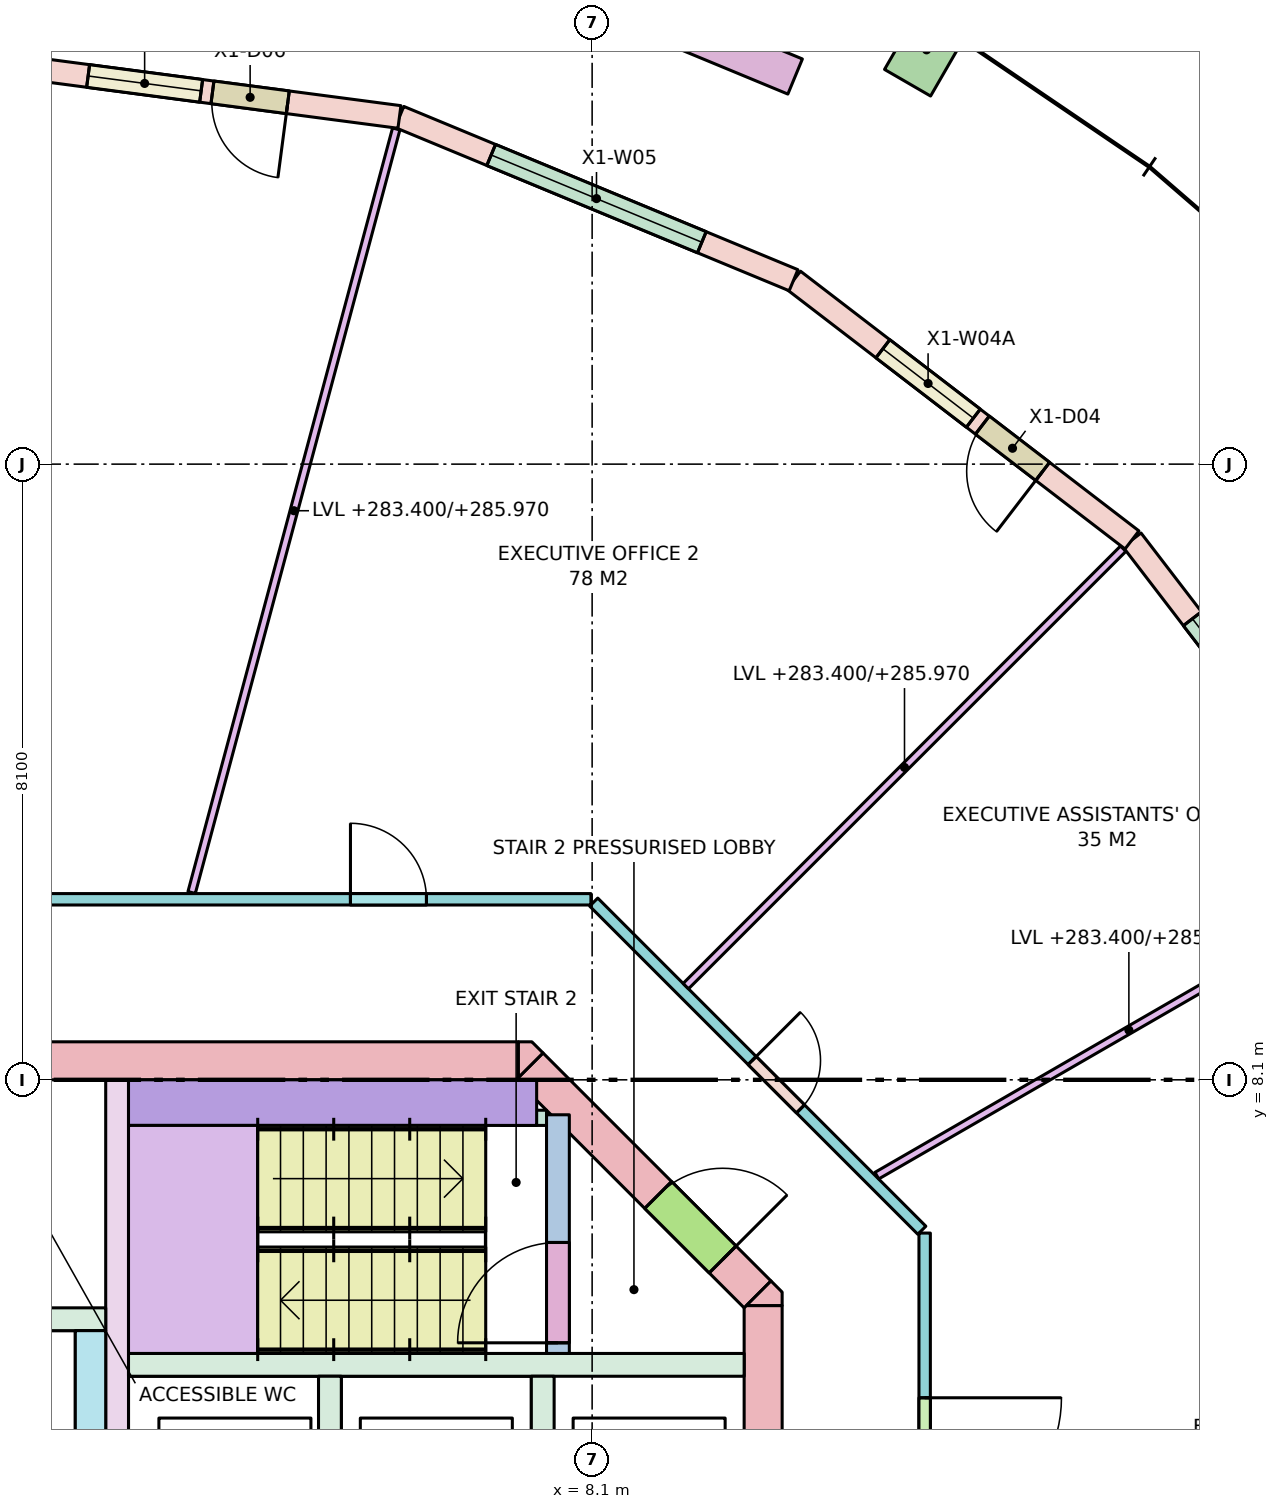
"""IFC4 building model, lengths in metres.
Left out: names, types, materials, properties, quantities, classifications, styles, units other than length and angle.
Written with IfcOpenShell. Run it as: python <this file> out.ifc"""

import sys

from ifc_helpers import new_model, si_unit, direction, frame, frame_2d, origin, origin_2d, place, context, subcontext, project, spatial, polyline, rectangle, outline, extrude, element, fill, save


model = new_model("IFC4")
c1 = context("Model", 3, precision=1e-05, world=origin(), true_north=direction((0.0, 1.0)))
c2 = subcontext(c1, "Body", "Model", "MODEL_VIEW")
j1 = project(units=[si_unit("LENGTHUNIT", "METRE"), si_unit("PLANEANGLEUNIT", "RADIAN")], contexts=[c1])
p1 = place(None, origin())
s1 = spatial("IfcSite", under=j1, at=p1, CompositionType="ELEMENT")
p2 = place(p1, origin())
s2 = spatial("IfcBuilding", under=s1, at=p2, CompositionType="ELEMENT")
p3 = place(p2, frame((0.0, 0.0, 283.4)))
s3 = spatial("IfcBuildingStorey", under=s2, at=p3, CompositionType="ELEMENT", Elevation=283.4)
p4 = place(p3, frame((12.5, 21.651, 0.0), z_axis=(0.0, 0.0, 1.0), x_axis=(-0.866025403784, 0.5, 0.0)))
e1 = element("IfcColumn", 1, at=p4, inside=s3, PredefinedType="COLUMN", context=c2, shape_type="SweptSolid", body=[
    extrude(rectangle(XDim=0.7, YDim=1.0, at=origin_2d()), origin(), (0.0, 0.0, 1.0), 3.7),
])
p5 = place(p3, frame((-7.13, 8.35, -0.28), z_axis=(0.0, 0.0, 1.0), x_axis=(1.0, 0.0, 0.0)))
e2 = element("IfcWall", 2, at=p5, inside=s3, PredefinedType="SHEAR", context=c2, shape_type="SweptSolid", body=[
    extrude(rectangle(XDim=14.26, YDim=0.5, at=frame_2d((7.13, 0.0))), origin(), (0.0, 0.0, 1.0), 3.7),
])
p6 = place(p5, frame((5.48, 0.0, 0.28)))
e3 = element("IfcOpeningElement", 3, at=p6, cuts=e2, PredefinedType="OPENING", context=c2, shape_type="SweptSolid", body=[
    extrude(rectangle(XDim=0.7, YDim=2.1, at=frame_2d((0.35, 1.05))), frame((0.0, 0.26, 0.0), z_axis=(0.0, -1.0, 0.0), x_axis=(1.0, 0.0, 0.0)), (0.0, 0.0, 1.0), 0.52),
])
p7 = place(p5, frame((7.155, 0.0, 0.28)))
e4 = element("IfcOpeningElement", 4, at=p7, cuts=e2, PredefinedType="OPENING", context=c2, shape_type="SweptSolid", body=[
    extrude(rectangle(XDim=0.9, YDim=2.1, at=frame_2d((0.45, 1.05))), frame((0.0, 0.26, 0.0), z_axis=(0.0, -1.0, 0.0), x_axis=(1.0, 0.0, 0.0)), (0.0, 0.0, 1.0), 0.52),
])
p8 = place(p3, frame((10.35, -5.13, -0.28), z_axis=(0.0, 0.0, 1.0), x_axis=(0.0, 1.0, 0.0)))
e5 = element("IfcWall", 5, at=p8, inside=s3, PredefinedType="SHEAR", context=c2, shape_type="SweptSolid", body=[
    extrude(rectangle(XDim=10.26, YDim=0.5, at=frame_2d((5.13, 0.0))), origin(), (0.0, 0.0, 1.0), 3.7),
])
p9 = place(p8, frame((4.13, 0.0, 0.28)))
e6 = element("IfcOpeningElement", 6, at=p9, cuts=e5, PredefinedType="OPENING", context=c2, shape_type="SweptSolid", body=[
    extrude(rectangle(XDim=2.0, YDim=2.1, at=frame_2d((1.0, 1.05))), frame((0.0, 0.26, 0.0), z_axis=(0.0, -1.0, 0.0), x_axis=(1.0, 0.0, 0.0)), (0.0, 0.0, 1.0), 0.52),
])
p10 = place(p3, frame((7.277, 8.277, -0.28), z_axis=(0.0, 0.0, 1.0), x_axis=(0.707106781187, -0.707106781187, 0.0)))
e7 = element("IfcWall", 7, at=p10, inside=s3, PredefinedType="SHEAR", context=c2, shape_type="SweptSolid", body=[
    extrude(rectangle(XDim=4.243, YDim=0.5, at=frame_2d((2.121, 0.0))), origin(), (0.0, 0.0, 1.0), 3.7),
])
p11 = place(p10, frame((2.393, 0.0, 0.28)))
e8 = element("IfcOpeningElement", 8, at=p11, cuts=e7, PredefinedType="OPENING", context=c2, shape_type="SweptSolid", body=[
    extrude(rectangle(XDim=1.2, YDim=2.1, at=frame_2d((0.6, 1.05))), frame((0.0, 0.26, 0.0), z_axis=(0.0, -1.0, 0.0), x_axis=(1.0, 0.0, 0.0)), (0.0, 0.0, 1.0), 0.52),
])
p12 = place(p3, frame((0.0, 0.0, -0.28)))
e9 = element("IfcWall", 9, at=p12, inside=s3, PredefinedType="SHEAR", context=c2, shape_type="SweptSolid", body=[
    extrude(outline(polyline([(10.6, 5.307), (10.6, 5.13), (10.13, 5.13), (10.454, 5.454), (10.6, 5.307)])), origin(), (0.0, 0.0, 1.0), 3.7),
])
p13 = place(p3, frame((0.0, 0.0, -0.28)))
e10 = element("IfcWall", 10, at=p13, inside=s3, PredefinedType="SHEAR", context=c2, shape_type="SweptSolid", body=[
    extrude(outline(polyline([(7.307, 8.6), (7.454, 8.454), (7.13, 8.13), (7.13, 8.6), (7.307, 8.6)])), origin(), (0.0, 0.0, 1.0), 3.7),
])
p14 = place(p3, frame((2.0, 4.35, 0.0), z_axis=(0.0, 0.0, 1.0), x_axis=(1.0, 0.0, 0.0)))
e11 = element("IfcWall", 11, at=p14, inside=s3, PredefinedType="SOLIDWALL", context=c2, shape_type="SweptSolid", body=[
    extrude(rectangle(XDim=8.1, YDim=0.3, at=frame_2d((4.05, 0.0))), origin(), (0.0, 0.0, 1.0), 3.42),
])
for number, where, z_axis, x_axis in (
    (12, (4.65, 1.8, 0.0), (0.0, 0.0, 1.0), (0.0, 1.0, 0.0)),
    (13, (7.45, 1.8, 0.0), (0.0, 0.0, 1.0), (0.0, 1.0, 0.0)),
):
    element("IfcWall", number, at=place(p3, frame(where, z_axis=z_axis, x_axis=x_axis)), inside=s3, PredefinedType="SOLIDWALL", context=c2, shape_type="SweptSolid", body=[
        extrude(rectangle(XDim=2.4, YDim=0.3, at=frame_2d((1.2, 0.0))), origin(), (0.0, 0.0, 1.0), 3.42),
    ])
p15 = place(p3, frame((1.85, 1.5, 0.0), z_axis=(0.0, 0.0, 1.0), x_axis=(0.0, 1.0, 0.0)))
e14 = element("IfcWall", 14, at=p15, inside=s3, PredefinedType="SHEAR", context=c2, shape_type="SweptSolid", body=[
    extrude(rectangle(XDim=6.6, YDim=0.3, at=frame_2d((3.3, 0.0))), origin(), (0.0, 0.0, 1.0), 3.42),
])
p16 = place(p3, frame((1.5, 1.8, 0.0), z_axis=(0.0, 0.0, 1.0), x_axis=(0.0, 1.0, 0.0)))
e15 = element("IfcWall", 15, at=p16, inside=s3, PredefinedType="SOLIDWALL", context=c2, shape_type="SweptSolid", body=[
    extrude(rectangle(XDim=3.0, YDim=0.4, at=frame_2d((1.5, 0.0))), origin(), (0.0, 0.0, 1.0), 3.42),
])
p17 = place(p3, frame((-1.7, 4.95, 0.0), z_axis=(0.0, 0.0, 1.0), x_axis=(1.0, 0.0, 0.0)))
e16 = element("IfcWall", 16, at=p17, inside=s3, PredefinedType="SOLIDWALL", context=c2, shape_type="SweptSolid", body=[
    extrude(rectangle(XDim=3.4, YDim=0.3, at=frame_2d((1.7, 0.0))), origin(), (0.0, 0.0, 1.0), 3.42),
])
p18 = place(p3, frame((7.65, 4.5, 0.0), z_axis=(0.0, 0.0, 1.0), x_axis=(0.0, 1.0, 0.0)))
e17 = element("IfcWall", 17, at=p18, inside=s3, PredefinedType="SHEAR", context=c2, shape_type="SweptSolid", body=[
    extrude(rectangle(XDim=3.14, YDim=0.3, at=frame_2d((1.57, 0.0))), origin(), (0.0, 0.0, 1.0), 3.42),
])
p19 = place(p18, frame((0.14, 0.0, 0.0)))
e18 = element("IfcOpeningElement", 18, at=p19, cuts=e17, PredefinedType="OPENING", context=c2, shape_type="SweptSolid", body=[
    extrude(rectangle(XDim=1.32, YDim=2.1, at=frame_2d((0.66, 1.05))), frame((0.0, 0.16, 0.0), z_axis=(0.0, -1.0, 0.0), x_axis=(1.0, 0.0, 0.0)), (0.0, 0.0, 1.0), 0.32),
])
p20 = place(p3, frame((2.0, 7.8, 0.0), z_axis=(0.0, 0.0, 1.0), x_axis=(1.0, 0.0, 0.0)))
e19 = element("IfcWall", 19, at=p20, inside=s3, PredefinedType="SHEAR", context=c2, shape_type="SweptSolid", body=[
    extrude(rectangle(XDim=5.37, YDim=0.6, at=frame_2d((2.685, 0.0))), origin(), (0.0, 0.0, 1.0), 3.42),
])
p21 = place(p3, frame((6.9, 7.6, 0.0), z_axis=(0.0, 0.0, 1.0), x_axis=(1.0, 0.0, 0.0)))
e20 = element("IfcWall", 20, at=p21, inside=s3, PredefinedType="SHEAR", context=c2, shape_type="SweptSolid", body=[
    extrude(rectangle(XDim=0.6, YDim=0.2, at=frame_2d((0.3, 0.0))), origin(), (0.0, 0.0, 1.0), 3.42),
])
p22 = place(p3, frame((18.619, 10.75, 0.0), z_axis=(0.0, 0.0, 1.0), x_axis=(-0.608726467567, 0.793380165925, 0.0)))
e21 = element("IfcWall", 21, at=p22, inside=s3, PredefinedType="STANDARD", context=c2, shape_type="SweptSolid", body=[
    extrude(rectangle(XDim=5.613, YDim=0.3, at=frame_2d((2.806, 0.0))), origin(), (0.0, 0.0, 1.0), 3.42),
])
p23 = place(p22, frame((1.306, 0.0, 0.8)))
e22 = element("IfcOpeningElement", 22, at=p23, cuts=e21, PredefinedType="OPENING", context=c2, shape_type="SweptSolid", body=[
    extrude(rectangle(XDim=3.0, YDim=2.4, at=frame_2d((1.5, 1.2))), frame((0.0, 0.16, 0.0), z_axis=(0.0, -1.0, 0.0), x_axis=(1.0, 0.0, 0.0)), (0.0, 0.0, 1.0), 0.32),
])
p24 = place(p3, frame((15.203, 15.203, 0.0), z_axis=(0.0, 0.0, 1.0), x_axis=(-0.793380165925, 0.608726467567, 0.0)))
e23 = element("IfcWall", 23, at=p24, inside=s3, PredefinedType="STANDARD", context=c2, shape_type="SweptSolid", body=[
    extrude(rectangle(XDim=5.613, YDim=0.3, at=frame_2d((2.806, 0.0))), origin(), (0.0, 0.0, 1.0), 3.42),
])
p25 = place(p24, frame((1.481, 0.0, 0.0)))
e24 = element("IfcOpeningElement", 24, at=p25, cuts=e23, PredefinedType="OPENING", context=c2, shape_type="SweptSolid", body=[
    extrude(rectangle(XDim=1.0, YDim=2.4, at=frame_2d((0.5, 1.2))), frame((0.0, 0.16, 0.0), z_axis=(0.0, -1.0, 0.0), x_axis=(1.0, 0.0, 0.0)), (0.0, 0.0, 1.0), 0.32),
])
p26 = place(p24, frame((2.631, 0.0, 0.8)))
e25 = element("IfcOpeningElement", 25, at=p26, cuts=e23, PredefinedType="OPENING", context=c2, shape_type="SweptSolid", body=[
    extrude(rectangle(XDim=1.5, YDim=2.4, at=frame_2d((0.75, 1.2))), frame((0.0, 0.16, 0.0), z_axis=(0.0, -1.0, 0.0), x_axis=(1.0, 0.0, 0.0)), (0.0, 0.0, 1.0), 0.32),
])
p27 = place(p3, frame((10.75, 18.619, 0.0), z_axis=(0.0, 0.0, 1.0), x_axis=(-0.92387156362, 0.382702670405, 0.0)))
e26 = element("IfcWall", 26, at=p27, inside=s3, PredefinedType="STANDARD", context=c2, shape_type="SweptSolid", body=[
    extrude(rectangle(XDim=5.613, YDim=0.3, at=frame_2d((2.806, 0.0))), origin(), (0.0, 0.0, 1.0), 3.42),
])
p28 = place(p27, frame((1.306, 0.0, 0.8)))
e27 = element("IfcOpeningElement", 27, at=p28, cuts=e26, PredefinedType="OPENING", context=c2, shape_type="SweptSolid", body=[
    extrude(rectangle(XDim=3.0, YDim=2.4, at=frame_2d((1.5, 1.2))), frame((0.0, 0.16, 0.0), z_axis=(0.0, -1.0, 0.0), x_axis=(1.0, 0.0, 0.0)), (0.0, 0.0, 1.0), 0.32),
])
p29 = place(p3, frame((5.565, 20.767, 0.0), z_axis=(0.0, 0.0, 1.0), x_axis=(-0.991443484334, 0.130536651449, 0.0)))
e28 = element("IfcWall", 28, at=p29, inside=s3, PredefinedType="STANDARD", context=c2, shape_type="SweptSolid", body=[
    extrude(rectangle(XDim=5.613, YDim=0.3, at=frame_2d((2.806, 0.0))), origin(), (0.0, 0.0, 1.0), 3.42),
])
p30 = place(p29, frame((1.481, 0.0, 0.0)))
e29 = element("IfcOpeningElement", 29, at=p30, cuts=e28, PredefinedType="OPENING", context=c2, shape_type="SweptSolid", body=[
    extrude(rectangle(XDim=1.0, YDim=2.4, at=frame_2d((0.5, 1.2))), frame((0.0, 0.16, 0.0), z_axis=(0.0, -1.0, 0.0), x_axis=(1.0, 0.0, 0.0)), (0.0, 0.0, 1.0), 0.32),
])
p31 = place(p29, frame((2.631, 0.0, 0.8)))
e30 = element("IfcOpeningElement", 30, at=p31, cuts=e28, PredefinedType="OPENING", context=c2, shape_type="SweptSolid", body=[
    extrude(rectangle(XDim=1.5, YDim=2.4, at=frame_2d((0.75, 1.2))), frame((0.0, 0.16, 0.0), z_axis=(0.0, -1.0, 0.0), x_axis=(1.0, 0.0, 0.0)), (0.0, 0.0, 1.0), 0.32),
])
p32 = place(p3, frame((10.771, 21.3, 0.0), z_axis=(0.0, 0.0, 1.0), x_axis=(-0.923875488976, 0.382693194178, 0.0)))
e31 = element("IfcWall", 31, at=p32, inside=s3, PredefinedType="PARAPET", context=c2, shape_type="SweptSolid", body=[
    extrude(rectangle(XDim=3.6, YDim=0.5, at=frame_2d((1.8, 0.0))), origin(), (0.0, 0.0, 1.0), 0.9),
])
p33 = place(p3, frame((-8.084, 10.475, 0.0), z_axis=(0.0, 0.0, 1.0), x_axis=(1.0, 0.0, 0.0)))
e32 = element("IfcWall", 32, at=p33, inside=s3, PredefinedType="PARTITIONING", context=c2, shape_type="SweptSolid", body=[
    extrude(rectangle(XDim=16.167, YDim=0.15, at=frame_2d((8.084, 0.0))), origin(), (0.0, 0.0, 1.0), 2.57),
])
p34 = place(p33, frame((13.004, 0.0, 0.0)))
e33 = element("IfcOpeningElement", 33, at=p34, cuts=e32, PredefinedType="OPENING", context=c2, shape_type="SweptSolid", body=[
    extrude(rectangle(XDim=1.0, YDim=2.1, at=frame_2d((0.5, 1.05))), frame((0.0, 0.085, 0.0), z_axis=(0.0, -1.0, 0.0), x_axis=(1.0, 0.0, 0.0)), (0.0, 0.0, 1.0), 0.17),
])
p35 = place(p33, frame((7.184, 0.0, 0.0)))
e34 = element("IfcOpeningElement", 34, at=p35, cuts=e32, PredefinedType="OPENING", context=c2, shape_type="SweptSolid", body=[
    extrude(rectangle(XDim=1.8, YDim=2.1, at=frame_2d((0.9, 1.05))), frame((0.0, 0.085, 0.0), z_axis=(0.0, -1.0, 0.0), x_axis=(1.0, 0.0, 0.0)), (0.0, 0.0, 1.0), 0.17),
])
p36 = place(p33, frame((3.153, 0.0, 0.0)))
e35 = element("IfcOpeningElement", 35, at=p36, cuts=e32, PredefinedType="OPENING", context=c2, shape_type="SweptSolid", body=[
    extrude(rectangle(XDim=1.0, YDim=2.1, at=frame_2d((0.5, 1.05))), frame((0.0, 0.085, 0.0), z_axis=(0.0, -1.0, 0.0), x_axis=(1.0, 0.0, 0.0)), (0.0, 0.0, 1.0), 0.17),
])
p37 = place(p3, frame((8.121, 10.438, 0.0), z_axis=(0.0, 0.0, 1.0), x_axis=(0.707106781187, -0.707106781187, 0.0)))
e36 = element("IfcWall", 36, at=p37, inside=s3, PredefinedType="PARTITIONING", context=c2, shape_type="SweptSolid", body=[
    extrude(rectangle(XDim=6.105, YDim=0.15, at=frame_2d((3.053, 0.0))), origin(), (0.0, 0.0, 1.0), 2.57),
])
p38 = place(p37, frame((2.948, 0.0, 0.0)))
e37 = element("IfcOpeningElement", 37, at=p38, cuts=e36, PredefinedType="OPENING", context=c2, shape_type="SweptSolid", body=[
    extrude(rectangle(XDim=0.9, YDim=2.1, at=frame_2d((0.45, 1.05))), frame((0.0, 0.085, 0.0), z_axis=(0.0, -1.0, 0.0), x_axis=(1.0, 0.0, 0.0)), (0.0, 0.0, 1.0), 0.17),
])
p39 = place(p3, frame((12.475, 6.084, 0.0), z_axis=(0.0, 0.0, 1.0), x_axis=(0.0, -1.0, 0.0)))
e38 = element("IfcWall", 38, at=p39, inside=s3, PredefinedType="PARTITIONING", context=c2, shape_type="SweptSolid", body=[
    extrude(rectangle(XDim=12.167, YDim=0.15, at=frame_2d((6.084, 0.0))), origin(), (0.0, 0.0, 1.0), 2.57),
])
p40 = place(p39, frame((8.601, 0.0, 0.0)))
e39 = element("IfcOpeningElement", 39, at=p40, cuts=e38, PredefinedType="OPENING", context=c2, shape_type="SweptSolid", body=[
    extrude(rectangle(XDim=1.0, YDim=2.1, at=frame_2d((0.5, 1.05))), frame((0.0, 0.085, 0.0), z_axis=(0.0, -1.0, 0.0), x_axis=(1.0, 0.0, 0.0)), (0.0, 0.0, 1.0), 0.17),
])
p41 = place(p39, frame((2.167, 0.0, 0.0)))
e40 = element("IfcOpeningElement", 40, at=p41, cuts=e38, PredefinedType="OPENING", context=c2, shape_type="SweptSolid", body=[
    extrude(rectangle(XDim=1.8, YDim=2.1, at=frame_2d((0.9, 1.05))), frame((0.0, 0.085, 0.0), z_axis=(0.0, -1.0, 0.0), x_axis=(1.0, 0.0, 0.0)), (0.0, 0.0, 1.0), 0.17),
])
p42 = place(p3, frame((11.846, 6.839, 0.0), z_axis=(0.0, 0.0, 1.0), x_axis=(0.866007734672, 0.500030602552, 0.0)))
e41 = element("IfcWall", 41, at=p42, inside=s3, PredefinedType="PARTITIONING", context=c2, shape_type="SweptSolid", body=[
    extrude(rectangle(XDim=7.658, YDim=0.1, at=frame_2d((3.829, 0.0))), origin(), (0.0, 0.0, 1.0), 2.57),
])
p43 = place(p3, frame((9.333, 9.333, 0.0), z_axis=(0.0, 0.0, 1.0), x_axis=(0.707106781187, 0.707106781187, 0.0)))
e42 = element("IfcWall", 42, at=p43, inside=s3, PredefinedType="PARTITIONING", context=c2, shape_type="SweptSolid", body=[
    extrude(rectangle(XDim=8.139, YDim=0.1, at=frame_2d((4.069, 0.0))), origin(), (0.0, 0.0, 1.0), 2.57),
])
p44 = place(p3, frame((2.831, 10.564, 0.0), z_axis=(0.0, 0.0, 1.0), x_axis=(0.258796321138, 0.965931914871, 0.0)))
e43 = element("IfcWall", 43, at=p44, inside=s3, PredefinedType="PARTITIONING", context=c2, shape_type="SweptSolid", body=[
    extrude(rectangle(XDim=10.4, YDim=0.1, at=frame_2d((5.2, 0.0))), origin(), (0.0, 0.0, 1.0), 2.57),
])
p45 = place(p23, origin())
e44 = element("IfcWindow", 44, at=p45, inside=s3, PartitioningType="SINGLE_PANEL", PredefinedType="WINDOW", context=c2, shape_type="SweptSolid", body=[
    extrude(rectangle(XDim=3.0, YDim=2.4, at=frame_2d((1.5, 1.2))), frame((0.0, 0.03, 0.0), z_axis=(0.0, -1.0, 0.0), x_axis=(1.0, 0.0, 0.0)), (0.0, 0.0, 1.0), 0.06),
])
fill(e22, e44)
p46 = place(p25, origin())
e45 = element("IfcDoor", 45, at=p46, inside=s3, OperationType="SINGLE_SWING_LEFT", PredefinedType="DOOR", context=c2, shape_type="SweptSolid", body=[
    extrude(rectangle(XDim=1.0, YDim=2.4, at=frame_2d((0.5, 1.2))), frame((0.0, 0.025, 0.0), z_axis=(0.0, -1.0, 0.0), x_axis=(1.0, 0.0, 0.0)), (0.0, 0.0, 1.0), 0.05),
])
fill(e24, e45)
p47 = place(p26, origin())
e46 = element("IfcWindow", 46, at=p47, inside=s3, PartitioningType="SINGLE_PANEL", PredefinedType="WINDOW", context=c2, shape_type="SweptSolid", body=[
    extrude(rectangle(XDim=1.5, YDim=2.4, at=frame_2d((0.75, 1.2))), frame((0.0, 0.03, 0.0), z_axis=(0.0, -1.0, 0.0), x_axis=(1.0, 0.0, 0.0)), (0.0, 0.0, 1.0), 0.06),
])
fill(e25, e46)
p48 = place(p28, origin())
e47 = element("IfcWindow", 47, at=p48, inside=s3, PartitioningType="SINGLE_PANEL", PredefinedType="WINDOW", context=c2, shape_type="SweptSolid", body=[
    extrude(rectangle(XDim=3.0, YDim=2.4, at=frame_2d((1.5, 1.2))), frame((0.0, 0.03, 0.0), z_axis=(0.0, -1.0, 0.0), x_axis=(1.0, 0.0, 0.0)), (0.0, 0.0, 1.0), 0.06),
])
fill(e27, e47)
p49 = place(p30, origin())
e48 = element("IfcDoor", 48, at=p49, inside=s3, OperationType="SINGLE_SWING_LEFT", PredefinedType="DOOR", context=c2, shape_type="SweptSolid", body=[
    extrude(rectangle(XDim=1.0, YDim=2.4, at=frame_2d((0.5, 1.2))), frame((0.0, 0.025, 0.0), z_axis=(0.0, -1.0, 0.0), x_axis=(1.0, 0.0, 0.0)), (0.0, 0.0, 1.0), 0.05),
])
fill(e29, e48)
p50 = place(p31, origin())
e49 = element("IfcWindow", 49, at=p50, inside=s3, PartitioningType="SINGLE_PANEL", PredefinedType="WINDOW", context=c2, shape_type="SweptSolid", body=[
    extrude(rectangle(XDim=1.5, YDim=2.4, at=frame_2d((0.75, 1.2))), frame((0.0, 0.03, 0.0), z_axis=(0.0, -1.0, 0.0), x_axis=(1.0, 0.0, 0.0)), (0.0, 0.0, 1.0), 0.06),
])
fill(e30, e49)
p51 = place(p19, origin())
e50 = element("IfcDoor", 50, at=p51, inside=s3, OperationType="DOUBLE_DOOR_SINGLE_SWING", PredefinedType="DOOR", context=c2, shape_type="SweptSolid", body=[
    extrude(rectangle(XDim=1.32, YDim=2.1, at=frame_2d((0.66, 1.05))), frame((0.0, 0.025, 0.0), z_axis=(0.0, -1.0, 0.0), x_axis=(1.0, 0.0, 0.0)), (0.0, 0.0, 1.0), 0.05),
])
fill(e18, e50)
p52 = place(p11, origin())
e51 = element("IfcDoor", 51, at=p52, inside=s3, OperationType="SINGLE_SWING_RIGHT", PredefinedType="DOOR", context=c2, shape_type="SweptSolid", body=[
    extrude(rectangle(XDim=1.2, YDim=2.1, at=frame_2d((0.6, 1.05))), frame((0.0, 0.025, 0.0), z_axis=(0.0, -1.0, 0.0), x_axis=(1.0, 0.0, 0.0)), (0.0, 0.0, 1.0), 0.05),
])
fill(e8, e51)
p53 = place(p41, origin())
e52 = element("IfcDoor", 52, at=p53, inside=s3, OperationType="DOUBLE_DOOR_SINGLE_SWING", PredefinedType="DOOR", context=c2, shape_type="SweptSolid", body=[
    extrude(rectangle(XDim=1.8, YDim=2.1, at=frame_2d((0.9, 1.05))), frame((0.0, 0.025, 0.0), z_axis=(0.0, -1.0, 0.0), x_axis=(1.0, 0.0, 0.0)), (0.0, 0.0, 1.0), 0.05),
])
fill(e40, e52)
p54 = place(p38, origin())
e53 = element("IfcDoor", 53, at=p54, inside=s3, OperationType="SINGLE_SWING_LEFT", PredefinedType="DOOR", context=c2, shape_type="SweptSolid", body=[
    extrude(rectangle(XDim=0.9, YDim=2.1, at=frame_2d((0.45, 1.05))), frame((0.0, 0.025, 0.0), z_axis=(0.0, -1.0, 0.0), x_axis=(1.0, 0.0, 0.0)), (0.0, 0.0, 1.0), 0.05),
])
fill(e37, e53)
p55 = place(p34, origin())
e54 = element("IfcDoor", 54, at=p55, inside=s3, OperationType="SINGLE_SWING_LEFT", PredefinedType="DOOR", context=c2, shape_type="SweptSolid", body=[
    extrude(rectangle(XDim=1.0, YDim=2.1, at=frame_2d((0.5, 1.05))), frame((0.0, 0.025, 0.0), z_axis=(0.0, -1.0, 0.0), x_axis=(1.0, 0.0, 0.0)), (0.0, 0.0, 1.0), 0.05),
])
fill(e33, e54)
save(model, sys.argv[1])
